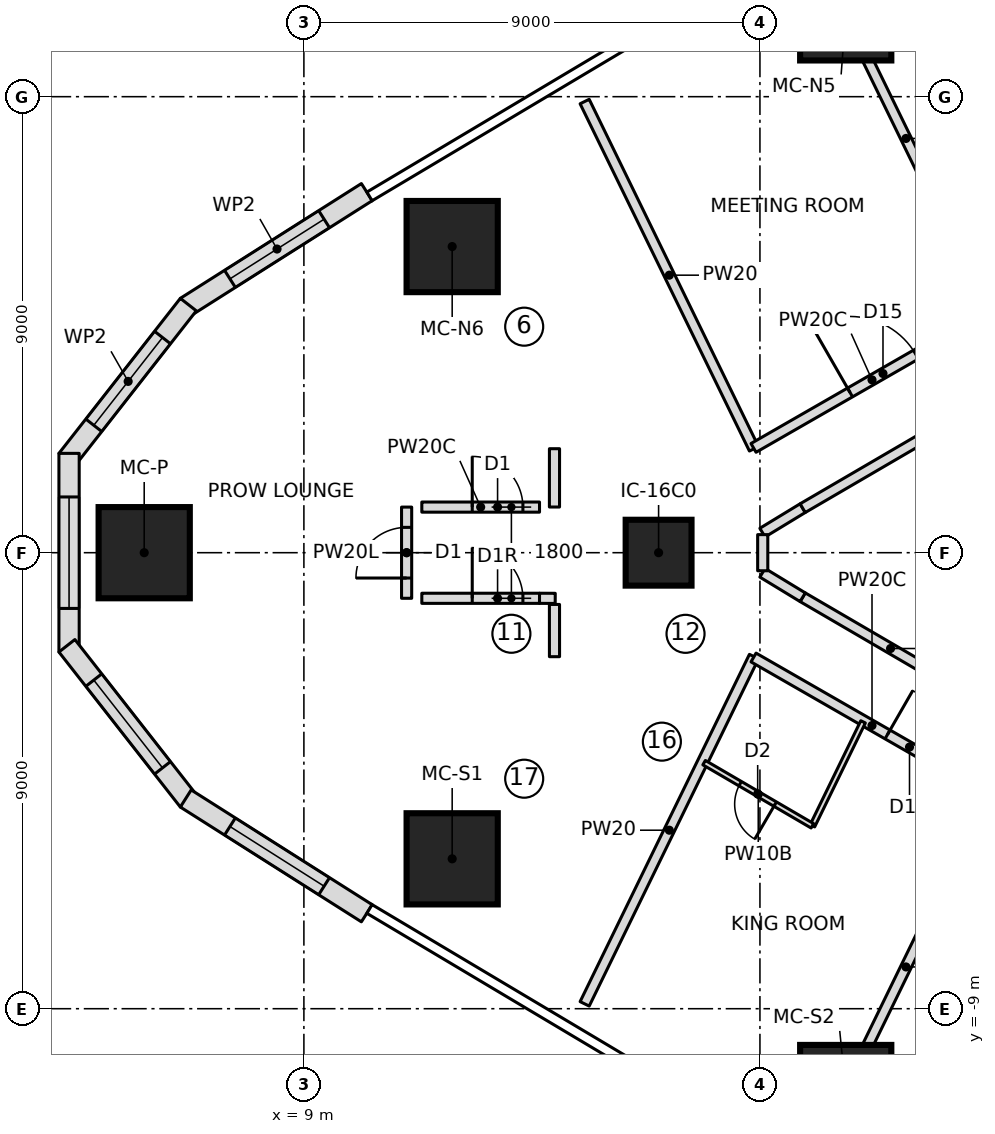
"""IFC4 building model, lengths in metres.
Left out: names, types, materials, properties, quantities, classifications, styles, units other than length and angle.
Written with IfcOpenShell. Run it as: python <this file> out.ifc"""

import sys

from ifc_helpers import new_model, si_unit, direction, frame, frame_2d, origin, origin_2d, place, context, subcontext, project, spatial, polyline, rectangle, outline, extrude, element, fill, save


model = new_model("IFC4")
c1 = context("Model", 3, precision=1e-05, world=origin(), true_north=direction((0.0, 1.0)))
c2 = subcontext(c1, "Body", "Model", "MODEL_VIEW")
j1 = project(units=[si_unit("LENGTHUNIT", "METRE"), si_unit("PLANEANGLEUNIT", "RADIAN")], contexts=[c1])
p1 = place(None, origin())
s1 = spatial("IfcSite", under=j1, at=p1, CompositionType="ELEMENT")
p2 = place(p1, origin())
s2 = spatial("IfcBuilding", under=s1, at=p2, CompositionType="ELEMENT")
p3 = place(p2, frame((0.0, 0.0, 46.7)))
s3 = spatial("IfcBuildingStorey", under=s2, at=p3, CompositionType="ELEMENT", Elevation=46.7)
for number, where, z_axis, x_axis in (
    (1, (5.848, 0.0, 0.0), (0.0, 0.0, 1.0), (1.0, 0.0, 0.0)),
    (2, (11.927, -6.042, 0.0), (0.0, 0.0, 1.0), (1.0, 0.0, 0.0)),
    (3, (19.693, -10.615, 0.0), (0.0, 0.0, 1.0), (1.0, 0.0, 0.0)),
    (4, (19.693, 10.615, 0.0), (0.0, 0.0, 1.0), (1.0, 0.0, 0.0)),
    (5, (11.927, 6.042, 0.0), (0.0, 0.0, 1.0), (1.0, 0.0, 0.0)),
):
    element("IfcColumn", number, at=place(p3, frame(where, z_axis=z_axis, x_axis=x_axis)), inside=s3, PredefinedType="COLUMN", context=c2, shape_type="SweptSolid", body=[
        extrude(rectangle(XDim=1.8, YDim=1.8, at=origin_2d()), origin(), (0.0, 0.0, 1.0), 3.55),
    ])
p4 = place(p3, frame((16.0, 0.0, 0.0), z_axis=(0.0, 0.0, 1.0), x_axis=(1.0, 0.0, 0.0)))
e6 = element("IfcColumn", 6, at=p4, inside=s3, PredefinedType="COLUMN", context=c2, shape_type="SweptSolid", body=[
    extrude(rectangle(XDim=1.3, YDim=1.3, at=origin_2d()), origin(), (0.0, 0.0, 1.0), 3.55),
])
p5 = place(p3, frame((10.242, 7.116, 0.0), z_axis=(0.0, 0.0, 1.0), x_axis=(-0.844551578623, -0.535474211372, 0.0)))
e7 = element("IfcWall", 7, at=p5, inside=s3, PredefinedType="NOTDEFINED", context=c2, shape_type="SweptSolid", body=[
    extrude(outline(polyline([(0.0, -0.2), (4.23, -0.2), (4.162, 0.2), (0.0, 0.2), (0.0, -0.2)])), origin(), (0.0, 0.0, 1.0), 3.25),
])
p6 = place(p5, frame((0.998, 0.0, 0.6)))
e8 = element("IfcOpeningElement", 8, at=p6, cuts=e7, PredefinedType="OPENING", context=c2, shape_type="SweptSolid", body=[
    extrude(outline(polyline([(0.0, 1.35), (0.084, 1.771), (0.322, 2.128), (0.679, 2.366), (1.1, 2.45), (1.521, 2.366), (1.878, 2.128), (2.116, 1.771), (2.2, 1.35), (2.2, 1.1), (2.116, 0.679), (1.878, 0.322), (1.521, 0.084), (1.1, 0.0), (0.679, 0.084), (0.322, 0.322), (0.084, 0.679), (0.0, 1.1), (0.0, 1.35)])), frame((0.0, 0.21, 0.0), z_axis=(0.0, -1.0, 0.0), x_axis=(1.0, 0.0, 0.0)), (0.0, 0.0, 1.0), 0.42),
])
p7 = place(p3, frame((6.698, 4.87, 0.0), z_axis=(0.0, 0.0, 1.0), x_axis=(-0.616586647779, -0.787287054245, 0.0)))
e9 = element("IfcWall", 9, at=p7, inside=s3, PredefinedType="NOTDEFINED", context=c2, shape_type="SweptSolid", body=[
    extrude(outline(polyline([(-0.034, -0.2), (3.852, -0.2), (3.714, 0.2), (0.034, 0.2), (-0.034, -0.2)])), origin(), (0.0, 0.0, 1.0), 3.25),
])
p8 = place(p7, frame((0.792, 0.0, 0.6)))
e10 = element("IfcOpeningElement", 10, at=p8, cuts=e9, PredefinedType="OPENING", context=c2, shape_type="SweptSolid", body=[
    extrude(outline(polyline([(0.0, 1.35), (0.084, 1.771), (0.322, 2.128), (0.679, 2.366), (1.1, 2.45), (1.521, 2.366), (1.878, 2.128), (2.116, 1.771), (2.2, 1.35), (2.2, 1.1), (2.116, 0.679), (1.878, 0.322), (1.521, 0.084), (1.1, 0.0), (0.679, 0.084), (0.322, 0.322), (0.084, 0.679), (0.0, 1.1), (0.0, 1.35)])), frame((0.0, 0.21, 0.0), z_axis=(0.0, -1.0, 0.0), x_axis=(1.0, 0.0, 0.0)), (0.0, 0.0, 1.0), 0.42),
])
p9 = place(p3, frame((4.365, 1.891, 0.0), z_axis=(0.0, 0.0, 1.0), x_axis=(0.0, -1.0, 0.0)))
e11 = element("IfcWall", 11, at=p9, inside=s3, PredefinedType="NOTDEFINED", context=c2, shape_type="SweptSolid", body=[
    extrude(outline(polyline([(-0.069, -0.2), (3.852, -0.2), (3.714, 0.2), (0.069, 0.2), (-0.069, -0.2)])), origin(), (0.0, 0.0, 1.0), 3.25),
])
p10 = place(p9, frame((0.792, 0.0, 0.6)))
e12 = element("IfcOpeningElement", 12, at=p10, cuts=e11, PredefinedType="OPENING", context=c2, shape_type="SweptSolid", body=[
    extrude(outline(polyline([(0.0, 1.35), (0.084, 1.771), (0.322, 2.128), (0.679, 2.366), (1.1, 2.45), (1.521, 2.366), (1.878, 2.128), (2.116, 1.771), (2.2, 1.35), (2.2, 1.1), (2.116, 0.679), (1.878, 0.322), (1.521, 0.084), (1.1, 0.0), (0.679, 0.084), (0.322, 0.322), (0.084, 0.679), (0.0, 1.1), (0.0, 1.35)])), frame((0.0, 0.21, 0.0), z_axis=(0.0, -1.0, 0.0), x_axis=(1.0, 0.0, 0.0)), (0.0, 0.0, 1.0), 0.42),
])
p11 = place(p3, frame((4.365, -1.891, 0.0), z_axis=(0.0, 0.0, 1.0), x_axis=(0.616586647779, -0.787287054245, 0.0)))
e13 = element("IfcWall", 13, at=p11, inside=s3, PredefinedType="NOTDEFINED", context=c2, shape_type="SweptSolid", body=[
    extrude(outline(polyline([(-0.069, -0.2), (3.817, -0.2), (3.749, 0.2), (0.069, 0.2), (-0.069, -0.2)])), origin(), (0.0, 0.0, 1.0), 3.25),
])
p12 = place(p11, frame((0.792, 0.0, 0.6)))
e14 = element("IfcOpeningElement", 14, at=p12, cuts=e13, PredefinedType="OPENING", context=c2, shape_type="SweptSolid", body=[
    extrude(outline(polyline([(0.0, 1.35), (0.084, 1.771), (0.322, 2.128), (0.679, 2.366), (1.1, 2.45), (1.521, 2.366), (1.878, 2.128), (2.116, 1.771), (2.2, 1.35), (2.2, 1.1), (2.116, 0.679), (1.878, 0.322), (1.521, 0.084), (1.1, 0.0), (0.679, 0.084), (0.322, 0.322), (0.084, 0.679), (0.0, 1.1), (0.0, 1.35)])), frame((0.0, 0.21, 0.0), z_axis=(0.0, -1.0, 0.0), x_axis=(1.0, 0.0, 0.0)), (0.0, 0.0, 1.0), 0.42),
])
p13 = place(p3, frame((6.698, -4.87, 0.0), z_axis=(0.0, 0.0, 1.0), x_axis=(0.844551578623, -0.535474211372, 0.0)))
e15 = element("IfcWall", 15, at=p13, inside=s3, PredefinedType="NOTDEFINED", context=c2, shape_type="SweptSolid", body=[
    extrude(outline(polyline([(-0.034, -0.2), (4.196, -0.2), (4.196, 0.2), (0.034, 0.2), (-0.034, -0.2)])), origin(), (0.0, 0.0, 1.0), 3.25),
])
p14 = place(p13, frame((0.998, 0.0, 0.6)))
e16 = element("IfcOpeningElement", 16, at=p14, cuts=e15, PredefinedType="OPENING", context=c2, shape_type="SweptSolid", body=[
    extrude(outline(polyline([(0.0, 1.35), (0.084, 1.771), (0.322, 2.128), (0.679, 2.366), (1.1, 2.45), (1.521, 2.366), (1.878, 2.128), (2.116, 1.771), (2.2, 1.35), (2.2, 1.1), (2.116, 0.679), (1.878, 0.322), (1.521, 0.084), (1.1, 0.0), (0.679, 0.084), (0.322, 0.322), (0.084, 0.679), (0.0, 1.1), (0.0, 1.35)])), frame((0.0, 0.21, 0.0), z_axis=(0.0, -1.0, 0.0), x_axis=(1.0, 0.0, 0.0)), (0.0, 0.0, 1.0), 0.42),
])
p15 = place(p3, frame((11.027, -0.9, 0.0), z_axis=(0.0, 0.0, 1.0), x_axis=(0.0, 1.0, 0.0)))
e17 = element("IfcWall", 17, at=p15, inside=s3, PredefinedType="PARTITIONING", context=c2, shape_type="SweptSolid", body=[
    extrude(rectangle(XDim=1.8, YDim=0.2, at=frame_2d((0.9, 0.0))), origin(), (0.0, 0.0, 1.0), 3.25),
])
p16 = place(p15, frame((0.4, 0.0, 0.0)))
e18 = element("IfcOpeningElement", 18, at=p16, cuts=e17, PredefinedType="OPENING", context=c2, shape_type="SweptSolid", body=[
    extrude(rectangle(XDim=1.0, YDim=2.1, at=frame_2d((0.5, 1.05))), frame((0.0, 0.11, 0.0), z_axis=(0.0, -1.0, 0.0), x_axis=(1.0, 0.0, 0.0)), (0.0, 0.0, 1.0), 0.22),
])
p17 = place(p3, frame((17.882, 2.05, 0.0), z_axis=(0.0, 0.0, 1.0), x_axis=(-0.438213564788, 0.898870887078, 0.0)))
e19 = element("IfcWall", 19, at=p17, inside=s3, PredefinedType="PARTITIONING", context=c2, shape_type="SweptSolid", body=[
    extrude(rectangle(XDim=7.625, YDim=0.2, at=frame_2d((3.813, 0.0))), origin(), (0.0, 0.0, 1.0), 3.25),
])
p18 = place(p3, frame((17.874, 2.068, 0.0), z_axis=(0.0, 0.0, 1.0), x_axis=(0.867093061484, 0.4981461861, 0.0)))
e20 = element("IfcWall", 20, at=p18, inside=s3, PredefinedType="PARTITIONING", context=c2, shape_type="SweptSolid", body=[
    extrude(rectangle(XDim=5.393, YDim=0.2, at=frame_2d((2.697, 0.0))), origin(), (0.0, 0.0, 1.0), 3.25),
])
p19 = place(p18, frame((2.197, 0.0, 0.0)))
e21 = element("IfcOpeningElement", 21, at=p19, cuts=e20, PredefinedType="OPENING", context=c2, shape_type="SweptSolid", body=[
    extrude(rectangle(XDim=1.5, YDim=2.1, at=frame_2d((0.75, 1.05))), frame((0.0, 0.11, 0.0), z_axis=(0.0, -1.0, 0.0), x_axis=(1.0, 0.0, 0.0)), (0.0, 0.0, 1.0), 0.22),
])
p20 = place(p3, frame((22.55, 4.755, 0.0), z_axis=(0.0, 0.0, 1.0), x_axis=(-0.438210669268, 0.898872298683, 0.0)))
e22 = element("IfcWall", 22, at=p20, inside=s3, PredefinedType="PARTITIONING", context=c2, shape_type="SweptSolid", body=[
    extrude(rectangle(XDim=7.612, YDim=0.2, at=frame_2d((3.806, 0.0))), origin(), (0.0, 0.0, 1.0), 3.25),
])
p21 = place(p3, frame((14.541, -8.904, 0.0), z_axis=(0.0, 0.0, 1.0), x_axis=(0.438213564788, 0.898870887078, 0.0)))
e23 = element("IfcWall", 23, at=p21, inside=s3, PredefinedType="PARTITIONING", context=c2, shape_type="SweptSolid", body=[
    extrude(rectangle(XDim=7.625, YDim=0.2, at=frame_2d((3.813, 0.0))), origin(), (0.0, 0.0, 1.0), 3.25),
])
p22 = place(p3, frame((17.874, -2.068, 0.0), z_axis=(0.0, 0.0, 1.0), x_axis=(0.867093061484, -0.4981461861, 0.0)))
e24 = element("IfcWall", 24, at=p22, inside=s3, PredefinedType="PARTITIONING", context=c2, shape_type="SweptSolid", body=[
    extrude(rectangle(XDim=5.393, YDim=0.2, at=frame_2d((2.697, 0.0))), origin(), (0.0, 0.0, 1.0), 3.25),
])
p23 = place(p22, frame((3.05, 0.0, 0.0)))
e25 = element("IfcOpeningElement", 25, at=p23, cuts=e24, PredefinedType="OPENING", context=c2, shape_type="SweptSolid", body=[
    extrude(rectangle(XDim=1.0, YDim=2.1, at=frame_2d((0.5, 1.05))), frame((0.0, 0.11, 0.0), z_axis=(0.0, -1.0, 0.0), x_axis=(1.0, 0.0, 0.0)), (0.0, 0.0, 1.0), 0.22),
])
p24 = place(p3, frame((20.035, -3.338, 0.0), z_axis=(0.0, 0.0, 1.0), x_axis=(-0.438122322582, -0.898915363344, 0.0)))
e26 = element("IfcWall", 26, at=p24, inside=s3, PredefinedType="PARTITIONING", context=c2, shape_type="SweptSolid", body=[
    extrude(rectangle(XDim=2.283, YDim=0.1, at=frame_2d((1.142, 0.0))), origin(), (0.0, 0.0, 1.0), 3.25),
])
p25 = place(p3, frame((19.035, -5.39, 0.0), z_axis=(0.0, 0.0, 1.0), x_axis=(-0.863707305865, 0.503993739837, 0.0)))
e27 = element("IfcWall", 27, at=p25, inside=s3, PredefinedType="PARTITIONING", context=c2, shape_type="SweptSolid", body=[
    extrude(rectangle(XDim=2.474, YDim=0.1, at=frame_2d((1.237, 0.0))), origin(), (0.0, 0.0, 1.0), 3.25),
])
p26 = place(p25, frame((0.85, 0.0, 0.0)))
e28 = element("IfcOpeningElement", 28, at=p26, cuts=e27, PredefinedType="OPENING", context=c2, shape_type="SweptSolid", body=[
    extrude(rectangle(XDim=0.8, YDim=2.1, at=frame_2d((0.4, 1.05))), frame((0.0, 0.06, 0.0), z_axis=(0.0, -1.0, 0.0), x_axis=(1.0, 0.0, 0.0)), (0.0, 0.0, 1.0), 0.12),
])
p27 = place(p3, frame((19.214, -11.597, 0.0), z_axis=(0.0, 0.0, 1.0), x_axis=(0.438210669268, 0.898872298683, 0.0)))
e29 = element("IfcWall", 29, at=p27, inside=s3, PredefinedType="PARTITIONING", context=c2, shape_type="SweptSolid", body=[
    extrude(rectangle(XDim=7.612, YDim=0.2, at=frame_2d((3.806, 0.0))), origin(), (0.0, 0.0, 1.0), 3.25),
])
p28 = place(p3, frame((22.312, -2.903, 0.0), z_axis=(0.0, 0.0, 1.0), x_axis=(-0.863710538269, 0.503988200341, 0.0)))
e30 = element("IfcWall", 30, at=p28, inside=s3, PredefinedType="PARTITIONING", context=c2, shape_type="SweptSolid", body=[
    extrude(rectangle(XDim=4.016, YDim=0.2, at=frame_2d((2.008, 0.0))), origin(), (0.0, 0.0, 1.0), 3.25),
])
for number, where, z_axis, x_axis in (
    (31, (18.844, -0.879, 0.0), (0.0, 0.0, 1.0), (-0.854, 0.52, 0.0)),
    (32, (18.05, 0.396, 0.0), (0.0, 0.0, 1.0), (0.854, 0.52, 0.0)),
):
    element("IfcWall", number, at=place(p3, frame(where, z_axis=z_axis, x_axis=x_axis)), inside=s3, PredefinedType="PARTITIONING", context=c2, shape_type="SweptSolid", body=[
        extrude(rectangle(XDim=0.929, YDim=0.2, at=frame_2d((0.464, 0.0))), origin(), (0.0, 0.0, 1.0), 3.25),
    ])
p29 = place(p3, frame((18.844, 0.879, 0.0), z_axis=(0.0, 0.0, 1.0), x_axis=(0.863710538269, 0.503988200341, 0.0)))
e33 = element("IfcWall", 33, at=p29, inside=s3, PredefinedType="PARTITIONING", context=c2, shape_type="SweptSolid", body=[
    extrude(rectangle(XDim=4.016, YDim=0.2, at=frame_2d((2.008, 0.0))), origin(), (0.0, 0.0, 1.0), 3.25),
])
p30 = place(p3, frame((11.327, 0.9, 0.0), z_axis=(0.0, 0.0, 1.0), x_axis=(1.0, 0.0, 0.0)))
e34 = element("IfcWall", 34, at=p30, inside=s3, PredefinedType="PARTITIONING", context=c2, shape_type="SweptSolid", body=[
    extrude(rectangle(XDim=2.323, YDim=0.2, at=frame_2d((1.161, 0.0))), origin(), (0.0, 0.0, 1.0), 3.25),
])
p31 = place(p30, frame((0.995, 0.0, 0.0)))
e35 = element("IfcOpeningElement", 35, at=p31, cuts=e34, PredefinedType="OPENING", context=c2, shape_type="SweptSolid", body=[
    extrude(rectangle(XDim=1.0, YDim=2.1, at=frame_2d((0.5, 1.05))), frame((0.0, 0.11, 0.0), z_axis=(0.0, -1.0, 0.0), x_axis=(1.0, 0.0, 0.0)), (0.0, 0.0, 1.0), 0.22),
])
p32 = place(p3, frame((11.327, -0.9, 0.0), z_axis=(0.0, 0.0, 1.0), x_axis=(1.0, 0.0, 0.0)))
e36 = element("IfcWall", 36, at=p32, inside=s3, PredefinedType="PARTITIONING", context=c2, shape_type="SweptSolid", body=[
    extrude(rectangle(XDim=2.323, YDim=0.2, at=frame_2d((1.161, 0.0))), origin(), (0.0, 0.0, 1.0), 3.25),
])
p33 = place(p32, frame((0.995, 0.0, 0.0)))
e37 = element("IfcOpeningElement", 37, at=p33, cuts=e36, PredefinedType="OPENING", context=c2, shape_type="SweptSolid", body=[
    extrude(rectangle(XDim=1.0, YDim=2.1, at=frame_2d((0.5, 1.05))), frame((0.0, 0.11, 0.0), z_axis=(0.0, -1.0, 0.0), x_axis=(1.0, 0.0, 0.0)), (0.0, 0.0, 1.0), 0.22),
])
p34 = place(p3, frame((18.055, -0.357, 0.0), z_axis=(0.0, 0.0, 1.0), x_axis=(0.0, 1.0, 0.0)))
e38 = element("IfcWall", 38, at=p34, inside=s3, PredefinedType="PARTITIONING", context=c2, shape_type="SweptSolid", body=[
    extrude(rectangle(XDim=0.713, YDim=0.2, at=frame_2d((0.357, 0.0))), origin(), (0.0, 0.0, 1.0), 3.25),
])
p35 = place(p3, frame((13.946, 2.052, 0.0), z_axis=(0.0, 0.0, 1.0), x_axis=(-0.000424178117, -0.999999910036, 0.0)))
e39 = element("IfcWall", 39, at=p35, inside=s3, PredefinedType="PARTITIONING", context=c2, shape_type="SweptSolid", body=[
    extrude(rectangle(XDim=1.151, YDim=0.2, at=frame_2d((0.576, 0.0))), origin(), (0.0, 0.0, 1.0), 3.25),
])
p36 = place(p3, frame((13.65, -0.9, 0.0), z_axis=(0.0, 0.0, 1.0), x_axis=(0.999984810316, -0.005511727301, 0.0)))
e40 = element("IfcWall", 40, at=p36, inside=s3, PredefinedType="PARTITIONING", context=c2, shape_type="SweptSolid", body=[
    extrude(rectangle(XDim=0.31, YDim=0.2, at=frame_2d((0.155, 0.0))), origin(), (0.0, 0.0, 1.0), 3.25),
])
p37 = place(p3, frame((13.945, -1.021, 0.0), z_axis=(0.0, 0.0, 1.0), x_axis=(0.000473596916, -0.999999887853, 0.0)))
e41 = element("IfcWall", 41, at=p37, inside=s3, PredefinedType="PARTITIONING", context=c2, shape_type="SweptSolid", body=[
    extrude(rectangle(XDim=1.031, YDim=0.2, at=frame_2d((0.516, 0.0))), origin(), (0.0, 0.0, 1.0), 3.25),
])
p38 = place(p6, origin())
e42 = element("IfcWindow", 42, at=p38, inside=s3, PartitioningType="SINGLE_PANEL", PredefinedType="WINDOW", context=c2, shape_type="SweptSolid", body=[
    extrude(outline(polyline([(0.0, 1.35), (0.084, 1.771), (0.322, 2.128), (0.679, 2.366), (1.1, 2.45), (1.521, 2.366), (1.878, 2.128), (2.116, 1.771), (2.2, 1.35), (2.2, 1.1), (2.116, 0.679), (1.878, 0.322), (1.521, 0.084), (1.1, 0.0), (0.679, 0.084), (0.322, 0.322), (0.084, 0.679), (0.0, 1.1), (0.0, 1.35)])), frame((0.0, 0.17, 0.0), z_axis=(0.0, -1.0, 0.0), x_axis=(1.0, 0.0, 0.0)), (0.0, 0.0, 1.0), 0.06),
])
fill(e8, e42)
p39 = place(p8, origin())
e43 = element("IfcWindow", 43, at=p39, inside=s3, PartitioningType="SINGLE_PANEL", PredefinedType="WINDOW", context=c2, shape_type="SweptSolid", body=[
    extrude(outline(polyline([(0.0, 1.35), (0.084, 1.771), (0.322, 2.128), (0.679, 2.366), (1.1, 2.45), (1.521, 2.366), (1.878, 2.128), (2.116, 1.771), (2.2, 1.35), (2.2, 1.1), (2.116, 0.679), (1.878, 0.322), (1.521, 0.084), (1.1, 0.0), (0.679, 0.084), (0.322, 0.322), (0.084, 0.679), (0.0, 1.1), (0.0, 1.35)])), frame((0.0, 0.17, 0.0), z_axis=(0.0, -1.0, 0.0), x_axis=(1.0, 0.0, 0.0)), (0.0, 0.0, 1.0), 0.06),
])
fill(e10, e43)
p40 = place(p10, origin())
e44 = element("IfcWindow", 44, at=p40, inside=s3, PartitioningType="SINGLE_PANEL", PredefinedType="WINDOW", context=c2, shape_type="SweptSolid", body=[
    extrude(outline(polyline([(0.0, 1.35), (0.084, 1.771), (0.322, 2.128), (0.679, 2.366), (1.1, 2.45), (1.521, 2.366), (1.878, 2.128), (2.116, 1.771), (2.2, 1.35), (2.2, 1.1), (2.116, 0.679), (1.878, 0.322), (1.521, 0.084), (1.1, 0.0), (0.679, 0.084), (0.322, 0.322), (0.084, 0.679), (0.0, 1.1), (0.0, 1.35)])), frame((0.0, 0.17, 0.0), z_axis=(0.0, -1.0, 0.0), x_axis=(1.0, 0.0, 0.0)), (0.0, 0.0, 1.0), 0.06),
])
fill(e12, e44)
p41 = place(p12, origin())
e45 = element("IfcWindow", 45, at=p41, inside=s3, PartitioningType="SINGLE_PANEL", PredefinedType="WINDOW", context=c2, shape_type="SweptSolid", body=[
    extrude(outline(polyline([(0.0, 1.35), (0.084, 1.771), (0.322, 2.128), (0.679, 2.366), (1.1, 2.45), (1.521, 2.366), (1.878, 2.128), (2.116, 1.771), (2.2, 1.35), (2.2, 1.1), (2.116, 0.679), (1.878, 0.322), (1.521, 0.084), (1.1, 0.0), (0.679, 0.084), (0.322, 0.322), (0.084, 0.679), (0.0, 1.1), (0.0, 1.35)])), frame((0.0, 0.17, 0.0), z_axis=(0.0, -1.0, 0.0), x_axis=(1.0, 0.0, 0.0)), (0.0, 0.0, 1.0), 0.06),
])
fill(e14, e45)
p42 = place(p14, origin())
e46 = element("IfcWindow", 46, at=p42, inside=s3, PartitioningType="SINGLE_PANEL", PredefinedType="WINDOW", context=c2, shape_type="SweptSolid", body=[
    extrude(outline(polyline([(0.0, 1.35), (0.084, 1.771), (0.322, 2.128), (0.679, 2.366), (1.1, 2.45), (1.521, 2.366), (1.878, 2.128), (2.116, 1.771), (2.2, 1.35), (2.2, 1.1), (2.116, 0.679), (1.878, 0.322), (1.521, 0.084), (1.1, 0.0), (0.679, 0.084), (0.322, 0.322), (0.084, 0.679), (0.0, 1.1), (0.0, 1.35)])), frame((0.0, 0.17, 0.0), z_axis=(0.0, -1.0, 0.0), x_axis=(1.0, 0.0, 0.0)), (0.0, 0.0, 1.0), 0.06),
])
fill(e16, e46)
p43 = place(p31, origin())
e47 = element("IfcDoor", 47, at=p43, inside=s3, OperationType="SINGLE_SWING_LEFT", PredefinedType="DOOR", context=c2, shape_type="SweptSolid", body=[
    extrude(rectangle(XDim=1.0, YDim=2.1, at=frame_2d((0.5, 1.05))), frame((0.0, 0.025, 0.0), z_axis=(0.0, -1.0, 0.0), x_axis=(1.0, 0.0, 0.0)), (0.0, 0.0, 1.0), 0.05),
])
fill(e35, e47)
p44 = place(p33, origin())
e48 = element("IfcDoor", 48, at=p44, inside=s3, OperationType="SINGLE_SWING_RIGHT", PredefinedType="DOOR", context=c2, shape_type="SweptSolid", body=[
    extrude(rectangle(XDim=1.0, YDim=2.1, at=frame_2d((0.5, 1.05))), frame((0.0, 0.025, 0.0), z_axis=(0.0, -1.0, 0.0), x_axis=(1.0, 0.0, 0.0)), (0.0, 0.0, 1.0), 0.05),
])
fill(e37, e48)
p45 = place(p16, origin())
e49 = element("IfcDoor", 49, at=p45, inside=s3, OperationType="SINGLE_SWING_LEFT", PredefinedType="DOOR", context=c2, shape_type="SweptSolid", body=[
    extrude(rectangle(XDim=1.0, YDim=2.1, at=frame_2d((0.5, 1.05))), frame((0.0, 0.025, 0.0), z_axis=(0.0, -1.0, 0.0), x_axis=(1.0, 0.0, 0.0)), (0.0, 0.0, 1.0), 0.05),
])
fill(e18, e49)
p46 = place(p19, origin())
e50 = element("IfcDoor", 50, at=p46, inside=s3, OperationType="DOUBLE_DOOR_SINGLE_SWING", PredefinedType="DOOR", context=c2, shape_type="SweptSolid", body=[
    extrude(rectangle(XDim=1.5, YDim=2.1, at=frame_2d((0.75, 1.05))), frame((0.0, 0.025, 0.0), z_axis=(0.0, -1.0, 0.0), x_axis=(1.0, 0.0, 0.0)), (0.0, 0.0, 1.0), 0.05),
])
fill(e21, e50)
p47 = place(p26, origin())
e51 = element("IfcDoor", 51, at=p47, inside=s3, OperationType="SINGLE_SWING_LEFT", PredefinedType="DOOR", context=c2, shape_type="SweptSolid", body=[
    extrude(rectangle(XDim=0.8, YDim=2.1, at=frame_2d((0.4, 1.05))), frame((0.0, 0.025, 0.0), z_axis=(0.0, -1.0, 0.0), x_axis=(1.0, 0.0, 0.0)), (0.0, 0.0, 1.0), 0.05),
])
fill(e28, e51)
p48 = place(p23, origin())
e52 = element("IfcDoor", 52, at=p48, inside=s3, OperationType="SINGLE_SWING_RIGHT", PredefinedType="DOOR", context=c2, shape_type="SweptSolid", body=[
    extrude(rectangle(XDim=1.0, YDim=2.1, at=frame_2d((0.5, 1.05))), frame((0.0, 0.025, 0.0), z_axis=(0.0, -1.0, 0.0), x_axis=(1.0, 0.0, 0.0)), (0.0, 0.0, 1.0), 0.05),
])
fill(e25, e52)
save(model, sys.argv[1])
